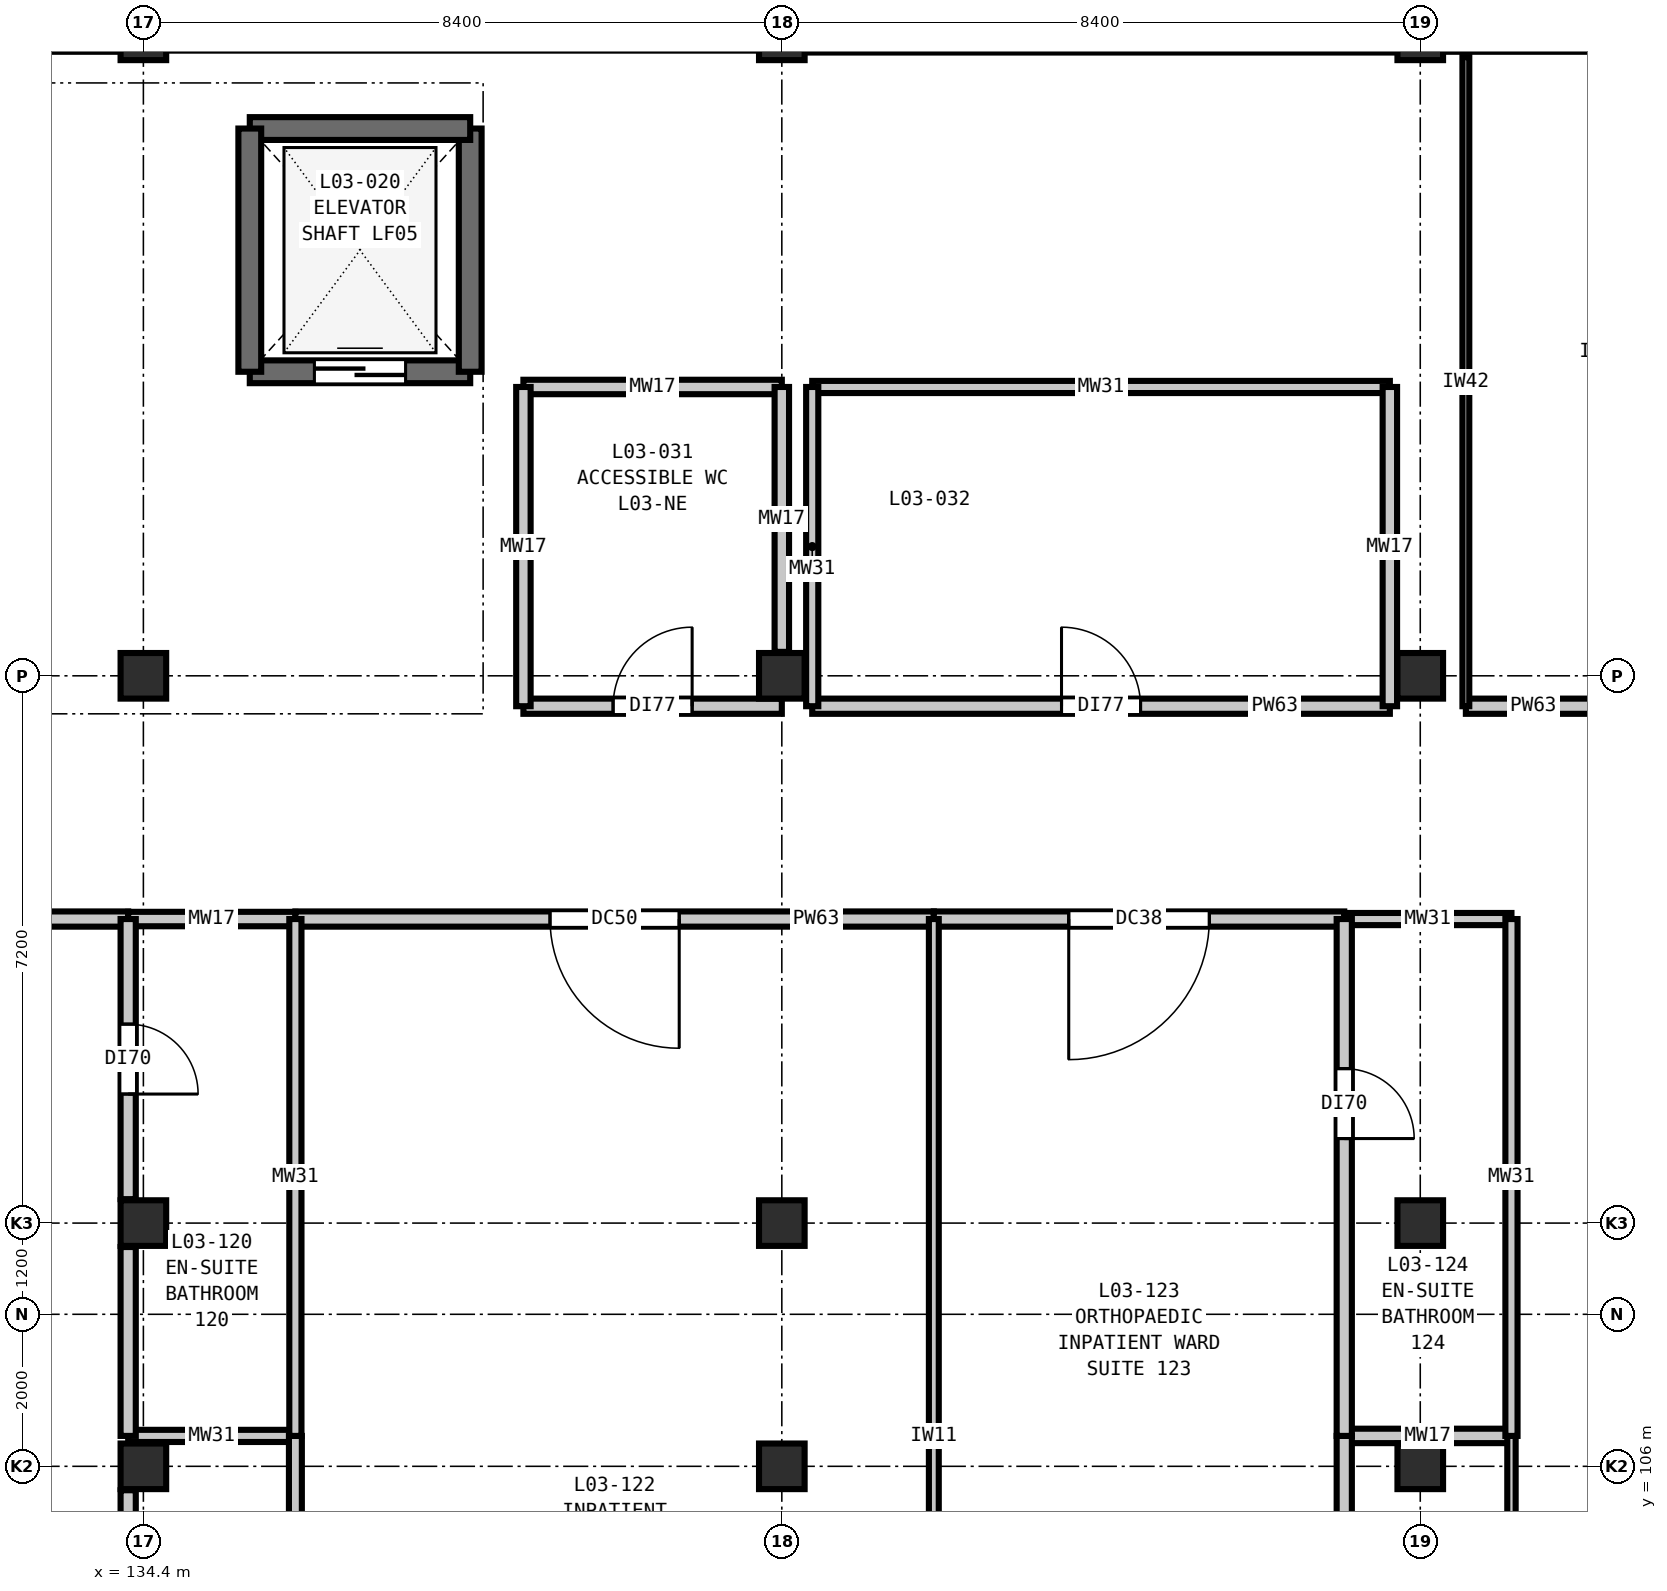
"""IFC4 building model, lengths in metres.
Left out: names, types, materials, properties, quantities, classifications, styles, units other than length and angle.
Written with IfcOpenShell. Run it as: python <this file> out.ifc"""

import sys

from ifc_helpers import new_model, si_unit, direction, frame, frame_2d, origin, origin_2d, place, context, subcontext, project, spatial, rectangle, extrude, element, fill, save


model = new_model("IFC4")
c1 = context("Model", 3, precision=1e-05, world=origin(), true_north=direction((0.0, 1.0)))
c2 = subcontext(c1, "Body", "Model", "MODEL_VIEW")
j1 = project(units=[si_unit("LENGTHUNIT", "METRE"), si_unit("PLANEANGLEUNIT", "RADIAN")], contexts=[c1])
p1 = place(None, origin())
s1 = spatial("IfcSite", under=j1, at=p1, CompositionType="ELEMENT")
p2 = place(p1, origin())
s2 = spatial("IfcBuilding", under=s1, at=p2, CompositionType="ELEMENT")
p3 = place(p2, frame((0.0, 0.0, 16.2)))
s3 = spatial("IfcBuildingStorey", under=s2, at=p3, CompositionType="ELEMENT", Elevation=16.2)
for number, where, z_axis, x_axis in (
    (1, (134.4, 106.0, 0.0), (0.0, 0.0, 1.0), (1.0, 0.0, 0.0)),
    (2, (134.4, 109.2, 0.0), (0.0, 0.0, 1.0), (1.0, 0.0, 0.0)),
    (3, (134.4, 116.4, 0.0), (0.0, 0.0, 1.0), (1.0, 0.0, 0.0)),
    (4, (134.4, 124.8, 0.0), (0.0, 0.0, 1.0), (1.0, 0.0, 0.0)),
    (5, (142.8, 106.0, 0.0), (0.0, 0.0, 1.0), (1.0, 0.0, 0.0)),
    (6, (142.8, 109.2, 0.0), (0.0, 0.0, 1.0), (1.0, 0.0, 0.0)),
    (7, (142.8, 116.4, 0.0), (0.0, 0.0, 1.0), (1.0, 0.0, 0.0)),
    (8, (142.8, 124.8, 0.0), (0.0, 0.0, 1.0), (1.0, 0.0, 0.0)),
    (9, (151.2, 106.0, 0.0), (0.0, 0.0, 1.0), (1.0, 0.0, 0.0)),
    (10, (151.2, 109.2, 0.0), (0.0, 0.0, 1.0), (1.0, 0.0, 0.0)),
    (11, (151.2, 116.4, 0.0), (0.0, 0.0, 1.0), (1.0, 0.0, 0.0)),
    (12, (151.2, 124.8, 0.0), (0.0, 0.0, 1.0), (1.0, 0.0, 0.0)),
):
    element("IfcColumn", number, at=place(p3, frame(where, z_axis=z_axis, x_axis=x_axis)), inside=s3, PredefinedType="COLUMN", context=c2, shape_type="SweptSolid", body=[
        extrude(rectangle(XDim=0.6, YDim=0.6, at=origin_2d()), origin(), (0.0, 0.0, 1.0), 4.2),
    ])
p4 = place(p3, frame((135.8, 120.4, 0.0), z_axis=(0.0, 0.0, 1.0), x_axis=(1.0, 0.0, 0.0)))
e13 = element("IfcWall", 13, at=p4, inside=s3, PredefinedType="SHEAR", context=c2, shape_type="SweptSolid", body=[
    extrude(rectangle(XDim=2.9, YDim=0.3, at=frame_2d((1.45, 0.0))), origin(), (0.0, 0.0, 1.0), 4.2),
])
p5 = place(p4, frame((0.85, 0.0, 0.0)))
e14 = element("IfcOpeningElement", 14, at=p5, cuts=e13, PredefinedType="OPENING", context=c2, shape_type="SweptSolid", body=[
    extrude(rectangle(XDim=1.2, YDim=2.2, at=frame_2d((0.6, 1.1))), frame((0.0, 0.16, 0.0), z_axis=(0.0, -1.0, 0.0), x_axis=(1.0, 0.0, 0.0)), (0.0, 0.0, 1.0), 0.32),
])
p6 = place(p3, frame((138.7, 120.4, 0.0), z_axis=(0.0, 0.0, 1.0), x_axis=(0.0, 1.0, 0.0)))
e15 = element("IfcWall", 15, at=p6, inside=s3, PredefinedType="SHEAR", context=c2, shape_type="SweptSolid", body=[
    extrude(rectangle(XDim=3.2, YDim=0.3, at=frame_2d((1.6, 0.0))), origin(), (0.0, 0.0, 1.0), 4.2),
])
p7 = place(p3, frame((138.7, 123.6, 0.0), z_axis=(0.0, 0.0, 1.0), x_axis=(-1.0, 0.0, 0.0)))
e16 = element("IfcWall", 16, at=p7, inside=s3, PredefinedType="SHEAR", context=c2, shape_type="SweptSolid", body=[
    extrude(rectangle(XDim=2.9, YDim=0.3, at=frame_2d((1.45, 0.0))), origin(), (0.0, 0.0, 1.0), 4.2),
])
p8 = place(p3, frame((135.8, 123.6, 0.0), z_axis=(0.0, 0.0, 1.0), x_axis=(0.0, -1.0, 0.0)))
e17 = element("IfcWall", 17, at=p8, inside=s3, PredefinedType="SHEAR", context=c2, shape_type="SweptSolid", body=[
    extrude(rectangle(XDim=3.2, YDim=0.3, at=frame_2d((1.6, 0.0))), origin(), (0.0, 0.0, 1.0), 4.2),
])
p9 = place(p3, frame((134.2, 106.4, 0.0), z_axis=(0.0, 0.0, 1.0), x_axis=(1.0, 0.0, 0.0)))
e18 = element("IfcWall", 18, at=p9, inside=s3, PredefinedType="PLUMBINGWALL", context=c2, shape_type="SweptSolid", body=[
    extrude(rectangle(XDim=2.2, YDim=0.16, at=frame_2d((1.1, 0.0))), origin(), (0.0, 0.0, 1.0), 3.89),
])
p10 = place(p3, frame((150.2, 106.4, 0.0), z_axis=(0.0, 0.0, 1.0), x_axis=(1.0, 0.0, 0.0)))
e19 = element("IfcWall", 19, at=p10, inside=s3, PredefinedType="PLUMBINGWALL", context=c2, shape_type="SweptSolid", body=[
    extrude(rectangle(XDim=2.2, YDim=0.19, at=frame_2d((1.1, 0.0))), origin(), (0.0, 0.0, 1.0), 3.89),
])
p11 = place(p3, frame((128.8, 113.2, 0.0), z_axis=(0.0, 0.0, 1.0), x_axis=(1.0, 0.0, 0.0)))
e20 = element("IfcWall", 20, at=p11, inside=s3, PredefinedType="PARTITIONING", context=c2, shape_type="SweptSolid", body=[
    extrude(rectangle(XDim=5.4, YDim=0.2, at=frame_2d((2.7, 0.0))), origin(), (0.0, 0.0, 1.0), 3.89),
])
p12 = place(p11, frame((1.925, 0.0, 0.0)))
e21 = element("IfcOpeningElement", 21, at=p12, cuts=e20, PredefinedType="OPENING", context=c2, shape_type="SweptSolid", body=[
    extrude(rectangle(XDim=1.55, YDim=2.25, at=frame_2d((0.775, 1.125))), frame((0.0, 0.11, 0.0), z_axis=(0.0, -1.0, 0.0), x_axis=(1.0, 0.0, 0.0)), (0.0, 0.0, 1.0), 0.22),
])
p13 = place(p3, frame((134.2, 113.2, 0.0), z_axis=(0.0, 0.0, 1.0), x_axis=(1.0, 0.0, 0.0)))
e22 = element("IfcWall", 22, at=p13, inside=s3, PredefinedType="PLUMBINGWALL", context=c2, shape_type="SweptSolid", body=[
    extrude(rectangle(XDim=2.2, YDim=0.19, at=frame_2d((1.1, 0.0))), origin(), (0.0, 0.0, 1.0), 3.89),
])
p14 = place(p3, frame((136.4, 113.2, 0.0), z_axis=(0.0, 0.0, 1.0), x_axis=(1.0, 0.0, 0.0)))
e23 = element("IfcWall", 23, at=p14, inside=s3, PredefinedType="PARTITIONING", context=c2, shape_type="SweptSolid", body=[
    extrude(rectangle(XDim=8.4, YDim=0.2, at=frame_2d((4.2, 0.0))), origin(), (0.0, 0.0, 1.0), 3.89),
])
p15 = place(p14, frame((3.35, 0.0, 0.0)))
e24 = element("IfcOpeningElement", 24, at=p15, cuts=e23, PredefinedType="OPENING", context=c2, shape_type="SweptSolid", body=[
    extrude(rectangle(XDim=1.7, YDim=2.3, at=frame_2d((0.85, 1.15))), frame((0.0, 0.11, 0.0), z_axis=(0.0, -1.0, 0.0), x_axis=(1.0, 0.0, 0.0)), (0.0, 0.0, 1.0), 0.22),
])
p16 = place(p3, frame((144.8, 113.2, 0.0), z_axis=(0.0, 0.0, 1.0), x_axis=(1.0, 0.0, 0.0)))
e25 = element("IfcWall", 25, at=p16, inside=s3, PredefinedType="PARTITIONING", context=c2, shape_type="SweptSolid", body=[
    extrude(rectangle(XDim=5.4, YDim=0.2, at=frame_2d((2.7, 0.0))), origin(), (0.0, 0.0, 1.0), 3.89),
])
p17 = place(p16, frame((1.775, 0.0, 0.0)))
e26 = element("IfcOpeningElement", 26, at=p17, cuts=e25, PredefinedType="OPENING", context=c2, shape_type="SweptSolid", body=[
    extrude(rectangle(XDim=1.85, YDim=2.3, at=frame_2d((0.925, 1.15))), frame((0.0, 0.11, 0.0), z_axis=(0.0, -1.0, 0.0), x_axis=(1.0, 0.0, 0.0)), (0.0, 0.0, 1.0), 0.22),
])
p18 = place(p3, frame((150.2, 113.2, 0.0), z_axis=(0.0, 0.0, 1.0), x_axis=(1.0, 0.0, 0.0)))
e27 = element("IfcWall", 27, at=p18, inside=s3, PredefinedType="PLUMBINGWALL", context=c2, shape_type="SweptSolid", body=[
    extrude(rectangle(XDim=2.2, YDim=0.16, at=frame_2d((1.1, 0.0))), origin(), (0.0, 0.0, 1.0), 3.89),
])
p19 = place(p3, frame((139.4, 116.0, 0.0), z_axis=(0.0, 0.0, 1.0), x_axis=(1.0, 0.0, 0.0)))
e28 = element("IfcWall", 28, at=p19, inside=s3, PredefinedType="PARTITIONING", context=c2, shape_type="SweptSolid", body=[
    extrude(rectangle(XDim=3.4, YDim=0.2, at=frame_2d((1.7, 0.0))), origin(), (0.0, 0.0, 1.0), 3.89),
])
p20 = place(p19, frame((1.18, 0.0, 0.0)))
e29 = element("IfcOpeningElement", 29, at=p20, cuts=e28, PredefinedType="OPENING", context=c2, shape_type="SweptSolid", body=[
    extrude(rectangle(XDim=1.04, YDim=2.1, at=frame_2d((0.52, 1.05))), frame((0.0, 0.11, 0.0), z_axis=(0.0, -1.0, 0.0), x_axis=(1.0, 0.0, 0.0)), (0.0, 0.0, 1.0), 0.22),
])
p21 = place(p3, frame((143.2, 116.0, 0.0), z_axis=(0.0, 0.0, 1.0), x_axis=(1.0, 0.0, 0.0)))
e30 = element("IfcWall", 30, at=p21, inside=s3, PredefinedType="PARTITIONING", context=c2, shape_type="SweptSolid", body=[
    extrude(rectangle(XDim=7.6, YDim=0.2, at=frame_2d((3.8, 0.0))), origin(), (0.0, 0.0, 1.0), 3.89),
])
p22 = place(p21, frame((3.28, 0.0, 0.0)))
e31 = element("IfcOpeningElement", 31, at=p22, cuts=e30, PredefinedType="OPENING", context=c2, shape_type="SweptSolid", body=[
    extrude(rectangle(XDim=1.04, YDim=2.1, at=frame_2d((0.52, 1.05))), frame((0.0, 0.11, 0.0), z_axis=(0.0, -1.0, 0.0), x_axis=(1.0, 0.0, 0.0)), (0.0, 0.0, 1.0), 0.22),
])
p23 = place(p3, frame((151.8, 116.0, 0.0), z_axis=(0.0, 0.0, 1.0), x_axis=(1.0, 0.0, 0.0)))
e32 = element("IfcWall", 32, at=p23, inside=s3, PredefinedType="PARTITIONING", context=c2, shape_type="SweptSolid", body=[
    extrude(rectangle(XDim=5.4, YDim=0.2, at=frame_2d((2.7, 0.0))), origin(), (0.0, 0.0, 1.0), 3.89),
])
p24 = place(p23, frame((2.025, 0.0, 0.0)))
e33 = element("IfcOpeningElement", 33, at=p24, cuts=e32, PredefinedType="OPENING", context=c2, shape_type="SweptSolid", body=[
    extrude(rectangle(XDim=1.35, YDim=2.2, at=frame_2d((0.675, 1.1))), frame((0.0, 0.11, 0.0), z_axis=(0.0, -1.0, 0.0), x_axis=(1.0, 0.0, 0.0)), (0.0, 0.0, 1.0), 0.22),
])
p25 = place(p3, frame((139.4, 120.2, 0.0), z_axis=(0.0, 0.0, 1.0), x_axis=(1.0, 0.0, 0.0)))
e34 = element("IfcWall", 34, at=p25, inside=s3, PredefinedType="PLUMBINGWALL", context=c2, shape_type="SweptSolid", body=[
    extrude(rectangle(XDim=3.4, YDim=0.19, at=frame_2d((1.7, 0.0))), origin(), (0.0, 0.0, 1.0), 3.89),
])
p26 = place(p3, frame((143.2, 120.2, 0.0), z_axis=(0.0, 0.0, 1.0), x_axis=(1.0, 0.0, 0.0)))
e35 = element("IfcWall", 35, at=p26, inside=s3, PredefinedType="PLUMBINGWALL", context=c2, shape_type="SweptSolid", body=[
    extrude(rectangle(XDim=7.6, YDim=0.16, at=frame_2d((3.8, 0.0))), origin(), (0.0, 0.0, 1.0), 3.89),
])
p27 = place(p3, frame((134.2, 103.115, 0.0), z_axis=(0.0, 0.0, 1.0), x_axis=(0.0, 1.0, 0.0)))
e36 = element("IfcWall", 36, at=p27, inside=s3, PredefinedType="PARTITIONING", context=c2, shape_type="SweptSolid", body=[
    extrude(rectangle(XDim=2.57, YDim=0.2, at=frame_2d((1.285, 0.0))), origin(), (0.0, 0.0, 1.0), 3.585),
])
p28 = place(p3, frame((134.2, 109.515, 0.0), z_axis=(0.0, 0.0, 1.0), x_axis=(0.0, 1.0, 0.0)))
e37 = element("IfcWall", 37, at=p28, inside=s3, PredefinedType="PARTITIONING", context=c2, shape_type="SweptSolid", body=[
    extrude(rectangle(XDim=3.685, YDim=0.2, at=frame_2d((1.843, 0.0))), origin(), (0.0, 0.0, 1.0), 3.585),
])
p29 = place(p28, frame((1.383, 0.0, 0.0)))
e38 = element("IfcOpeningElement", 38, at=p29, cuts=e37, PredefinedType="OPENING", context=c2, shape_type="SweptSolid", body=[
    extrude(rectangle(XDim=0.92, YDim=2.1, at=frame_2d((0.46, 1.05))), frame((0.0, 0.11, 0.0), z_axis=(0.0, -1.0, 0.0), x_axis=(1.0, 0.0, 0.0)), (0.0, 0.0, 1.0), 0.22),
])
p30 = place(p3, frame((134.2, 106.4, 0.0), z_axis=(0.0, 0.0, 1.0), x_axis=(0.0, 1.0, 0.0)))
e39 = element("IfcWall", 39, at=p30, inside=s3, PredefinedType="PARTITIONING", context=c2, shape_type="SweptSolid", body=[
    extrude(rectangle(XDim=2.485, YDim=0.2, at=frame_2d((1.243, 0.0))), origin(), (0.0, 0.0, 1.0), 3.585),
])
p31 = place(p3, frame((136.4, 99.6, 0.0), z_axis=(0.0, 0.0, 1.0), x_axis=(0.0, 1.0, 0.0)))
e40 = element("IfcWall", 40, at=p31, inside=s3, PredefinedType="PARTITIONING", context=c2, shape_type="SweptSolid", body=[
    extrude(rectangle(XDim=6.8, YDim=0.17, at=frame_2d((3.4, 0.0))), origin(), (0.0, 0.0, 1.0), 3.89),
])
p32 = place(p3, frame((136.4, 106.4, 0.0), z_axis=(0.0, 0.0, 1.0), x_axis=(0.0, 1.0, 0.0)))
e41 = element("IfcWall", 41, at=p32, inside=s3, PredefinedType="PLUMBINGWALL", context=c2, shape_type="SweptSolid", body=[
    extrude(rectangle(XDim=6.8, YDim=0.16, at=frame_2d((3.4, 0.0))), origin(), (0.0, 0.0, 1.0), 3.89),
])
p33 = place(p3, frame((139.4, 116.0, 0.0), z_axis=(0.0, 0.0, 1.0), x_axis=(0.0, 1.0, 0.0)))
e42 = element("IfcWall", 42, at=p33, inside=s3, PredefinedType="PLUMBINGWALL", context=c2, shape_type="SweptSolid", body=[
    extrude(rectangle(XDim=4.2, YDim=0.19, at=frame_2d((2.1, 0.0))), origin(), (0.0, 0.0, 1.0), 3.89),
])
p34 = place(p3, frame((142.8, 116.715, 0.0), z_axis=(0.0, 0.0, 1.0), x_axis=(0.0, 1.0, 0.0)))
e43 = element("IfcWall", 43, at=p34, inside=s3, PredefinedType="PLUMBINGWALL", context=c2, shape_type="SweptSolid", body=[
    extrude(rectangle(XDim=3.485, YDim=0.19, at=frame_2d((1.742, 0.0))), origin(), (0.0, 0.0, 1.0), 3.585),
])
p35 = place(p3, frame((143.2, 116.0, 0.0), z_axis=(0.0, 0.0, 1.0), x_axis=(0.0, 1.0, 0.0)))
e44 = element("IfcWall", 44, at=p35, inside=s3, PredefinedType="PLUMBINGWALL", context=c2, shape_type="SweptSolid", body=[
    extrude(rectangle(XDim=4.2, YDim=0.16, at=frame_2d((2.1, 0.0))), origin(), (0.0, 0.0, 1.0), 3.89),
])
p36 = place(p3, frame((144.8, 99.6, 0.0), z_axis=(0.0, 0.0, 1.0), x_axis=(0.0, 1.0, 0.0)))
e45 = element("IfcWall", 45, at=p36, inside=s3, PredefinedType="PARTITIONING", context=c2, shape_type="SweptSolid", body=[
    extrude(rectangle(XDim=13.6, YDim=0.13, at=frame_2d((6.8, 0.0))), origin(), (0.0, 0.0, 1.0), 3.89),
])
p37 = place(p3, frame((150.2, 99.6, 0.0), z_axis=(0.0, 0.0, 1.0), x_axis=(0.0, 1.0, 0.0)))
e46 = element("IfcWall", 46, at=p37, inside=s3, PredefinedType="PARTITIONING", context=c2, shape_type="SweptSolid", body=[
    extrude(rectangle(XDim=6.8, YDim=0.2, at=frame_2d((3.4, 0.0))), origin(), (0.0, 0.0, 1.0), 3.89),
])
p38 = place(p37, frame((4.056, 0.0, 0.0)))
e47 = element("IfcOpeningElement", 47, at=p38, cuts=e46, PredefinedType="OPENING", context=c2, shape_type="SweptSolid", body=[
    extrude(rectangle(XDim=1.55, YDim=2.25, at=frame_2d((0.775, 1.125))), frame((0.0, 0.11, 0.0), z_axis=(0.0, -1.0, 0.0), x_axis=(1.0, 0.0, 0.0)), (0.0, 0.0, 1.0), 0.22),
])
p39 = place(p3, frame((150.2, 106.4, 0.0), z_axis=(0.0, 0.0, 1.0), x_axis=(0.0, 1.0, 0.0)))
e48 = element("IfcWall", 48, at=p39, inside=s3, PredefinedType="PARTITIONING", context=c2, shape_type="SweptSolid", body=[
    extrude(rectangle(XDim=6.8, YDim=0.2, at=frame_2d((3.4, 0.0))), origin(), (0.0, 0.0, 1.0), 3.89),
])
p40 = place(p39, frame((3.912, 0.0, 0.0)))
e49 = element("IfcOpeningElement", 49, at=p40, cuts=e48, PredefinedType="OPENING", context=c2, shape_type="SweptSolid", body=[
    extrude(rectangle(XDim=0.92, YDim=2.1, at=frame_2d((0.46, 1.05))), frame((0.0, 0.11, 0.0), z_axis=(0.0, -1.0, 0.0), x_axis=(1.0, 0.0, 0.0)), (0.0, 0.0, 1.0), 0.22),
])
p41 = place(p3, frame((150.8, 116.0, 0.0), z_axis=(0.0, 0.0, 1.0), x_axis=(0.0, 1.0, 0.0)))
e50 = element("IfcWall", 50, at=p41, inside=s3, PredefinedType="PLUMBINGWALL", context=c2, shape_type="SweptSolid", body=[
    extrude(rectangle(XDim=4.2, YDim=0.19, at=frame_2d((2.1, 0.0))), origin(), (0.0, 0.0, 1.0), 3.89),
])
p42 = place(p3, frame((151.8, 116.0, 0.0), z_axis=(0.0, 0.0, 1.0), x_axis=(0.0, 1.0, 0.0)))
e51 = element("IfcWall", 51, at=p42, inside=s3, PredefinedType="PARTITIONING", context=c2, shape_type="SweptSolid", body=[
    extrude(rectangle(XDim=8.54, YDim=0.09, at=frame_2d((4.27, 0.0))), origin(), (0.0, 0.0, 1.0), 3.89),
])
p43 = place(p3, frame((152.4, 99.6, 0.0), z_axis=(0.0, 0.0, 1.0), x_axis=(0.0, 1.0, 0.0)))
e52 = element("IfcWall", 52, at=p43, inside=s3, PredefinedType="PARTITIONING", context=c2, shape_type="SweptSolid", body=[
    extrude(rectangle(XDim=6.8, YDim=0.11, at=frame_2d((3.4, 0.0))), origin(), (0.0, 0.0, 1.0), 3.89),
])
p44 = place(p3, frame((152.4, 106.4, 0.0), z_axis=(0.0, 0.0, 1.0), x_axis=(0.0, 1.0, 0.0)))
e53 = element("IfcWall", 53, at=p44, inside=s3, PredefinedType="PLUMBINGWALL", context=c2, shape_type="SweptSolid", body=[
    extrude(rectangle(XDim=6.8, YDim=0.16, at=frame_2d((3.4, 0.0))), origin(), (0.0, 0.0, 1.0), 3.89),
])
p45 = place(p5, origin())
e54 = element("IfcDoor", 54, at=p45, inside=s3, OperationType="DOUBLE_DOOR_SLIDING", PredefinedType="DOOR", context=c2, shape_type="SweptSolid", body=[
    extrude(rectangle(XDim=1.2, YDim=2.2, at=frame_2d((0.6, 1.1))), frame((0.0, 0.025, 0.0), z_axis=(0.0, -1.0, 0.0), x_axis=(1.0, 0.0, 0.0)), (0.0, 0.0, 1.0), 0.05),
])
fill(e14, e54)
p46 = place(p15, frame((1.7, 0.0, 0.0), z_axis=(0.0, 0.0, 1.0), x_axis=(-1.0, 0.0, 0.0)))
e55 = element("IfcDoor", 55, at=p46, inside=s3, OperationType="SINGLE_SWING_LEFT", PredefinedType="DOOR", context=c2, shape_type="SweptSolid", body=[
    extrude(rectangle(XDim=1.7, YDim=2.3, at=frame_2d((0.85, 1.15))), frame((0.0, 0.025, 0.0), z_axis=(0.0, -1.0, 0.0), x_axis=(1.0, 0.0, 0.0)), (0.0, 0.0, 1.0), 0.05),
])
fill(e24, e55)
p47 = place(p17, frame((1.85, 0.0, 0.0), z_axis=(0.0, 0.0, 1.0), x_axis=(-1.0, 0.0, 0.0)))
e56 = element("IfcDoor", 56, at=p47, inside=s3, OperationType="SINGLE_SWING_RIGHT", PredefinedType="DOOR", context=c2, shape_type="SweptSolid", body=[
    extrude(rectangle(XDim=1.85, YDim=2.3, at=frame_2d((0.925, 1.15))), frame((0.0, 0.025, 0.0), z_axis=(0.0, -1.0, 0.0), x_axis=(1.0, 0.0, 0.0)), (0.0, 0.0, 1.0), 0.05),
])
fill(e26, e56)
p48 = place(p20, origin())
e57 = element("IfcDoor", 57, at=p48, inside=s3, OperationType="SINGLE_SWING_RIGHT", PredefinedType="DOOR", context=c2, shape_type="SweptSolid", body=[
    extrude(rectangle(XDim=1.04, YDim=2.1, at=frame_2d((0.52, 1.05))), frame((0.0, 0.025, 0.0), z_axis=(0.0, -1.0, 0.0), x_axis=(1.0, 0.0, 0.0)), (0.0, 0.0, 1.0), 0.05),
])
fill(e29, e57)
p49 = place(p22, origin())
e58 = element("IfcDoor", 58, at=p49, inside=s3, OperationType="SINGLE_SWING_LEFT", PredefinedType="DOOR", context=c2, shape_type="SweptSolid", body=[
    extrude(rectangle(XDim=1.04, YDim=2.1, at=frame_2d((0.52, 1.05))), frame((0.0, 0.025, 0.0), z_axis=(0.0, -1.0, 0.0), x_axis=(1.0, 0.0, 0.0)), (0.0, 0.0, 1.0), 0.05),
])
fill(e31, e58)
p50 = place(p29, frame((0.92, 0.0, 0.0), z_axis=(0.0, 0.0, 1.0), x_axis=(-1.0, 0.0, 0.0)))
e59 = element("IfcDoor", 59, at=p50, inside=s3, OperationType="SINGLE_SWING_RIGHT", PredefinedType="DOOR", context=c2, shape_type="SweptSolid", body=[
    extrude(rectangle(XDim=0.92, YDim=2.1, at=frame_2d((0.46, 1.05))), frame((0.0, 0.025, 0.0), z_axis=(0.0, -1.0, 0.0), x_axis=(1.0, 0.0, 0.0)), (0.0, 0.0, 1.0), 0.05),
])
fill(e38, e59)
p51 = place(p40, frame((0.92, 0.0, 0.0), z_axis=(0.0, 0.0, 1.0), x_axis=(-1.0, 0.0, 0.0)))
e60 = element("IfcDoor", 60, at=p51, inside=s3, OperationType="SINGLE_SWING_RIGHT", PredefinedType="DOOR", context=c2, shape_type="SweptSolid", body=[
    extrude(rectangle(XDim=0.92, YDim=2.1, at=frame_2d((0.46, 1.05))), frame((0.0, 0.025, 0.0), z_axis=(0.0, -1.0, 0.0), x_axis=(1.0, 0.0, 0.0)), (0.0, 0.0, 1.0), 0.05),
])
fill(e49, e60)
save(model, sys.argv[1])
